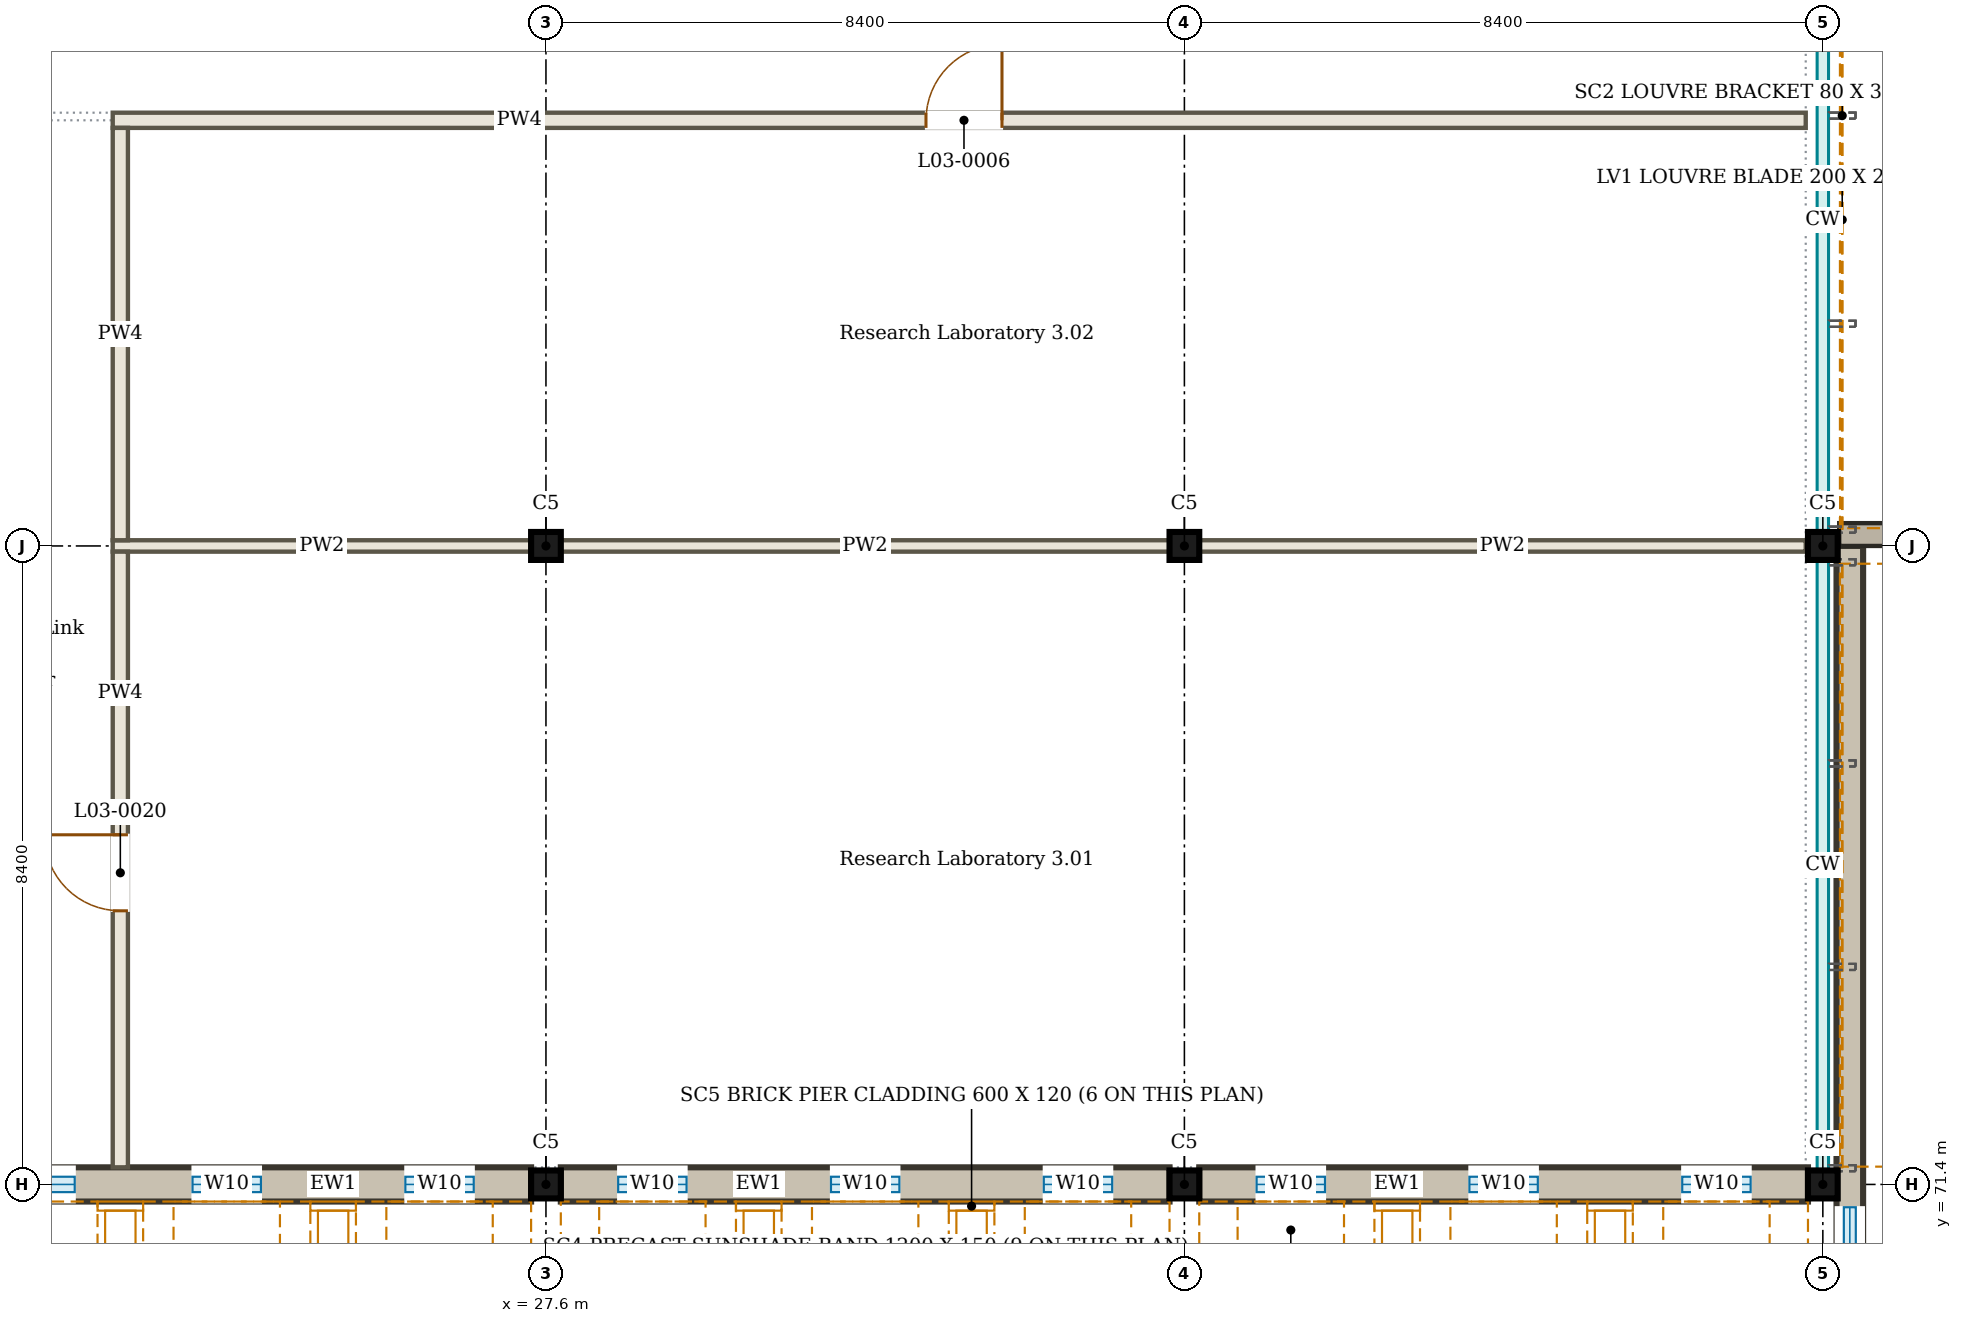
"""IFC4 building model, lengths in metres.
Left out: names, types, materials, properties, quantities, classifications, styles, units other than length and angle.
Written with IfcOpenShell. Run it as: python <this file> out.ifc"""

import sys

from ifc_helpers import new_model, si_unit, direction, frame, frame_2d, origin, origin_2d, place, context, subcontext, project, spatial, rectangle, i_section, extrude, element, fill, save


model = new_model("IFC4")
c1 = context("Model", 3, precision=1e-05, world=origin(), true_north=direction((0.0, 1.0)))
c2 = subcontext(c1, "Body", "Model", "MODEL_VIEW")
j1 = project(units=[si_unit("LENGTHUNIT", "METRE"), si_unit("PLANEANGLEUNIT", "RADIAN")], contexts=[c1])
p1 = place(None, origin())
s1 = spatial("IfcSite", under=j1, at=p1, CompositionType="ELEMENT")
p2 = place(p1, origin())
s2 = spatial("IfcBuilding", under=s1, at=p2, CompositionType="ELEMENT")
p3 = place(p2, frame((0.0, 0.0, 13.5)))
s3 = spatial("IfcBuildingStorey", under=s2, at=p3, CompositionType="ELEMENT", Elevation=13.5)
for number, where, z_axis, x_axis in (
    (1, (27.6, 71.4, 0.0), (0.0, 0.0, 1.0), (1.0, 0.0, 0.0)),
    (2, (36.0, 71.4, 0.0), (0.0, 0.0, 1.0), (1.0, 0.0, 0.0)),
    (3, (44.4, 71.4, 0.0), (0.0, 0.0, 1.0), (1.0, 0.0, 0.0)),
    (4, (27.6, 79.8, 0.0), (0.0, 0.0, 1.0), (1.0, 0.0, 0.0)),
    (5, (36.0, 79.8, 0.0), (0.0, 0.0, 1.0), (1.0, 0.0, 0.0)),
    (6, (44.4, 79.8, 0.0), (0.0, 0.0, 1.0), (1.0, 0.0, 0.0)),
):
    element("IfcColumn", number, at=place(p3, frame(where, z_axis=z_axis, x_axis=x_axis)), inside=s3, PredefinedType="COLUMN", context=c2, shape_type="SweptSolid", body=[
        extrude(i_section(OverallWidth=0.391, OverallDepth=0.368, WebThickness=0.015, FlangeThickness=0.024, FilletRadius=0.027, at=origin_2d()), origin(), (0.0, 0.0, 1.0), 4.5),
    ])
p4 = place(p3, frame((44.56, 71.584, 3.87), z_axis=(0.0, 0.0, 1.0), x_axis=(0.0, 1.0, 0.0)))
e7 = element("IfcWall", 7, at=p4, inside=s3, PredefinedType="SOLIDWALL", context=c2, shape_type="SweptSolid", body=[
    extrude(rectangle(XDim=8.032, YDim=0.13, at=frame_2d((4.016, 0.0))), origin(), (0.0, 0.0, 1.0), 0.63),
])
p5 = place(p3, frame((44.56, 79.984, 3.87), z_axis=(0.0, 0.0, 1.0), x_axis=(0.0, 1.0, 0.0)))
e8 = element("IfcWall", 8, at=p5, inside=s3, PredefinedType="SOLIDWALL", context=c2, shape_type="SweptSolid", body=[
    extrude(rectangle(XDim=8.216, YDim=0.13, at=frame_2d((4.108, 0.0))), origin(), (0.0, 0.0, 1.0), 0.63),
])
p6 = place(p3, frame((19.2, 71.4, 0.0), z_axis=(0.0, 0.0, 1.0), x_axis=(1.0, 0.0, 0.0)))
e9 = element("IfcWall", 9, at=p6, inside=s3, PredefinedType="SOLIDWALL", context=c2, shape_type="SweptSolid", body=[
    extrude(rectangle(XDim=8.205, YDim=0.45, at=frame_2d((4.102, 0.0))), origin(), (0.0, 0.0, 1.0), 3.85),
])
p7 = place(p6, frame((0.6, 0.0, 2.7)))
e10 = element("IfcOpeningElement", 10, at=p7, cuts=e9, PredefinedType="OPENING", context=c2, shape_type="SweptSolid", body=[
    extrude(rectangle(XDim=1.6, YDim=0.6, at=frame_2d((0.8, 0.3))), frame((0.0, 0.235, 0.0), z_axis=(0.0, -1.0, 0.0), x_axis=(1.0, 0.0, 0.0)), (0.0, 0.0, 1.0), 0.47),
])
p8 = place(p6, frame((3.75, 0.0, 1.0)))
e11 = element("IfcOpeningElement", 11, at=p8, cuts=e9, PredefinedType="OPENING", context=c2, shape_type="SweptSolid", body=[
    extrude(rectangle(XDim=0.9, YDim=1.2, at=frame_2d((0.45, 0.6))), frame((0.0, 0.235, 0.0), z_axis=(0.0, -1.0, 0.0), x_axis=(1.0, 0.0, 0.0)), (0.0, 0.0, 1.0), 0.47),
])
p9 = place(p6, frame((6.55, 0.0, 1.0)))
e12 = element("IfcOpeningElement", 12, at=p9, cuts=e9, PredefinedType="OPENING", context=c2, shape_type="SweptSolid", body=[
    extrude(rectangle(XDim=0.9, YDim=1.2, at=frame_2d((0.45, 0.6))), frame((0.0, 0.235, 0.0), z_axis=(0.0, -1.0, 0.0), x_axis=(1.0, 0.0, 0.0)), (0.0, 0.0, 1.0), 0.47),
])
p10 = place(p3, frame((19.2, 71.24, 3.87), z_axis=(0.0, 0.0, 1.0), x_axis=(1.0, 0.0, 0.0)))
e13 = element("IfcWall", 13, at=p10, inside=s3, PredefinedType="SOLIDWALL", context=c2, shape_type="SweptSolid", body=[
    extrude(rectangle(XDim=8.205, YDim=0.13, at=frame_2d((4.102, 0.0))), origin(), (0.0, 0.0, 1.0), 0.63),
])
p11 = place(p3, frame((27.795, 71.4, 0.0), z_axis=(0.0, 0.0, 1.0), x_axis=(1.0, 0.0, 0.0)))
e14 = element("IfcWall", 14, at=p11, inside=s3, PredefinedType="SOLIDWALL", context=c2, shape_type="SweptSolid", body=[
    extrude(rectangle(XDim=8.009, YDim=0.45, at=frame_2d((4.004, 0.0))), origin(), (0.0, 0.0, 1.0), 3.85),
])
p12 = place(p11, frame((0.754, 0.0, 1.0)))
e15 = element("IfcOpeningElement", 15, at=p12, cuts=e14, PredefinedType="OPENING", context=c2, shape_type="SweptSolid", body=[
    extrude(rectangle(XDim=0.9, YDim=1.2, at=frame_2d((0.45, 0.6))), frame((0.0, 0.235, 0.0), z_axis=(0.0, -1.0, 0.0), x_axis=(1.0, 0.0, 0.0)), (0.0, 0.0, 1.0), 0.47),
])
p13 = place(p11, frame((3.554, 0.0, 1.0)))
e16 = element("IfcOpeningElement", 16, at=p13, cuts=e14, PredefinedType="OPENING", context=c2, shape_type="SweptSolid", body=[
    extrude(rectangle(XDim=0.9, YDim=1.2, at=frame_2d((0.45, 0.6))), frame((0.0, 0.235, 0.0), z_axis=(0.0, -1.0, 0.0), x_axis=(1.0, 0.0, 0.0)), (0.0, 0.0, 1.0), 0.47),
])
p14 = place(p11, frame((6.354, 0.0, 1.0)))
e17 = element("IfcOpeningElement", 17, at=p14, cuts=e14, PredefinedType="OPENING", context=c2, shape_type="SweptSolid", body=[
    extrude(rectangle(XDim=0.9, YDim=1.2, at=frame_2d((0.45, 0.6))), frame((0.0, 0.235, 0.0), z_axis=(0.0, -1.0, 0.0), x_axis=(1.0, 0.0, 0.0)), (0.0, 0.0, 1.0), 0.47),
])
p15 = place(p3, frame((27.795, 71.24, 3.87), z_axis=(0.0, 0.0, 1.0), x_axis=(1.0, 0.0, 0.0)))
e18 = element("IfcWall", 18, at=p15, inside=s3, PredefinedType="SOLIDWALL", context=c2, shape_type="SweptSolid", body=[
    extrude(rectangle(XDim=8.009, YDim=0.13, at=frame_2d((4.004, 0.0))), origin(), (0.0, 0.0, 1.0), 0.63),
])
p16 = place(p3, frame((36.196, 71.4, 0.0), z_axis=(0.0, 0.0, 1.0), x_axis=(1.0, 0.0, 0.0)))
e19 = element("IfcWall", 19, at=p16, inside=s3, PredefinedType="SOLIDWALL", context=c2, shape_type="SweptSolid", body=[
    extrude(rectangle(XDim=8.009, YDim=0.45, at=frame_2d((4.004, 0.0))), origin(), (0.0, 0.0, 1.0), 3.85),
])
p17 = place(p16, frame((0.754, 0.0, 1.0)))
e20 = element("IfcOpeningElement", 20, at=p17, cuts=e19, PredefinedType="OPENING", context=c2, shape_type="SweptSolid", body=[
    extrude(rectangle(XDim=0.9, YDim=1.2, at=frame_2d((0.45, 0.6))), frame((0.0, 0.235, 0.0), z_axis=(0.0, -1.0, 0.0), x_axis=(1.0, 0.0, 0.0)), (0.0, 0.0, 1.0), 0.47),
])
p18 = place(p16, frame((3.554, 0.0, 1.0)))
e21 = element("IfcOpeningElement", 21, at=p18, cuts=e19, PredefinedType="OPENING", context=c2, shape_type="SweptSolid", body=[
    extrude(rectangle(XDim=0.9, YDim=1.2, at=frame_2d((0.45, 0.6))), frame((0.0, 0.235, 0.0), z_axis=(0.0, -1.0, 0.0), x_axis=(1.0, 0.0, 0.0)), (0.0, 0.0, 1.0), 0.47),
])
p19 = place(p16, frame((6.354, 0.0, 1.0)))
e22 = element("IfcOpeningElement", 22, at=p19, cuts=e19, PredefinedType="OPENING", context=c2, shape_type="SweptSolid", body=[
    extrude(rectangle(XDim=0.9, YDim=1.2, at=frame_2d((0.45, 0.6))), frame((0.0, 0.235, 0.0), z_axis=(0.0, -1.0, 0.0), x_axis=(1.0, 0.0, 0.0)), (0.0, 0.0, 1.0), 0.47),
])
p20 = place(p3, frame((36.196, 71.24, 3.87), z_axis=(0.0, 0.0, 1.0), x_axis=(1.0, 0.0, 0.0)))
e23 = element("IfcWall", 23, at=p20, inside=s3, PredefinedType="SOLIDWALL", context=c2, shape_type="SweptSolid", body=[
    extrude(rectangle(XDim=8.009, YDim=0.13, at=frame_2d((4.004, 0.0))), origin(), (0.0, 0.0, 1.0), 0.63),
])
p21 = place(p3, frame((44.615, 79.95, 0.0), z_axis=(0.0, 0.0, 1.0), x_axis=(1.0, 0.0, 0.0)))
e24 = element("IfcWall", 24, at=p21, inside=s3, PredefinedType="PARAPET", context=c2, shape_type="SweptSolid", body=[
    extrude(rectangle(XDim=8.185, YDim=0.3, at=frame_2d((4.092, 0.0))), origin(), (0.0, 0.0, 1.0), 1.0),
])
p22 = place(p3, frame((21.9, 79.8, 0.0), z_axis=(0.0, 0.0, 1.0), x_axis=(1.0, 0.0, 0.0)))
e25 = element("IfcWall", 25, at=p22, inside=s3, PredefinedType="PARTITIONING", context=c2, shape_type="SweptSolid", body=[
    extrude(rectangle(XDim=5.505, YDim=0.15, at=frame_2d((2.752, 0.0))), origin(), (0.0, 0.0, 1.0), 3.8),
])
p23 = place(p3, frame((27.795, 79.8, 0.0), z_axis=(0.0, 0.0, 1.0), x_axis=(1.0, 0.0, 0.0)))
e26 = element("IfcWall", 26, at=p23, inside=s3, PredefinedType="PARTITIONING", context=c2, shape_type="SweptSolid", body=[
    extrude(rectangle(XDim=8.009, YDim=0.15, at=frame_2d((4.004, 0.0))), origin(), (0.0, 0.0, 1.0), 3.8),
])
p24 = place(p3, frame((36.196, 79.8, 0.0), z_axis=(0.0, 0.0, 1.0), x_axis=(1.0, 0.0, 0.0)))
e27 = element("IfcWall", 27, at=p24, inside=s3, PredefinedType="PARTITIONING", context=c2, shape_type="SweptSolid", body=[
    extrude(rectangle(XDim=7.979, YDim=0.15, at=frame_2d((3.99, 0.0))), origin(), (0.0, 0.0, 1.0), 3.8),
])
p25 = place(p3, frame((21.9, 85.4, 0.0), z_axis=(0.0, 0.0, 1.0), x_axis=(1.0, 0.0, 0.0)))
e28 = element("IfcWall", 28, at=p25, inside=s3, PredefinedType="PARTITIONING", context=c2, shape_type="SweptSolid", body=[
    extrude(rectangle(XDim=22.275, YDim=0.2, at=frame_2d((11.138, 0.0))), origin(), (0.0, 0.0, 1.0), 3.8),
])
p26 = place(p25, frame((10.7, 0.0, 0.0)))
e29 = element("IfcOpeningElement", 29, at=p26, cuts=e28, PredefinedType="OPENING", context=c2, shape_type="SweptSolid", body=[
    extrude(rectangle(XDim=1.0, YDim=2.1, at=frame_2d((0.5, 1.05))), frame((0.0, 0.11, 0.0), z_axis=(0.0, -1.0, 0.0), x_axis=(1.0, 0.0, 0.0)), (0.0, 0.0, 1.0), 0.22),
])
p27 = place(p3, frame((22.0, 71.625, 0.0), z_axis=(0.0, 0.0, 1.0), x_axis=(0.0, 1.0, 0.0)))
e30 = element("IfcWall", 30, at=p27, inside=s3, PredefinedType="PARTITIONING", context=c2, shape_type="SweptSolid", body=[
    extrude(rectangle(XDim=8.1, YDim=0.2, at=frame_2d((4.05, 0.0))), origin(), (0.0, 0.0, 1.0), 3.8),
])
p28 = place(p27, frame((3.375, 0.0, 0.0)))
e31 = element("IfcOpeningElement", 31, at=p28, cuts=e30, PredefinedType="OPENING", context=c2, shape_type="SweptSolid", body=[
    extrude(rectangle(XDim=1.0, YDim=2.1, at=frame_2d((0.5, 1.05))), frame((0.0, 0.11, 0.0), z_axis=(0.0, -1.0, 0.0), x_axis=(1.0, 0.0, 0.0)), (0.0, 0.0, 1.0), 0.22),
])
p29 = place(p3, frame((22.0, 79.875, 0.0), z_axis=(0.0, 0.0, 1.0), x_axis=(0.0, 1.0, 0.0)))
e32 = element("IfcWall", 32, at=p29, inside=s3, PredefinedType="PARTITIONING", context=c2, shape_type="SweptSolid", body=[
    extrude(rectangle(XDim=5.425, YDim=0.2, at=frame_2d((2.712, 0.0))), origin(), (0.0, 0.0, 1.0), 3.8),
])
p30 = place(p7, origin())
e33 = element("IfcWindow", 33, at=p30, inside=s3, PartitioningType="SINGLE_PANEL", PredefinedType="WINDOW", context=c2, shape_type="SweptSolid", body=[
    extrude(rectangle(XDim=1.6, YDim=0.6, at=frame_2d((0.8, 0.3))), frame((0.0, 0.03, 0.0), z_axis=(0.0, -1.0, 0.0), x_axis=(1.0, 0.0, 0.0)), (0.0, 0.0, 1.0), 0.06),
])
fill(e10, e33)
p31 = place(p8, origin())
e34 = element("IfcWindow", 34, at=p31, inside=s3, PartitioningType="SINGLE_PANEL", PredefinedType="WINDOW", context=c2, shape_type="SweptSolid", body=[
    extrude(rectangle(XDim=0.9, YDim=1.2, at=frame_2d((0.45, 0.6))), frame((0.0, 0.135, 0.0), z_axis=(0.0, -1.0, 0.0), x_axis=(1.0, 0.0, 0.0)), (0.0, 0.0, 1.0), 0.06),
])
fill(e11, e34)
p32 = place(p9, origin())
e35 = element("IfcWindow", 35, at=p32, inside=s3, PartitioningType="SINGLE_PANEL", PredefinedType="WINDOW", context=c2, shape_type="SweptSolid", body=[
    extrude(rectangle(XDim=0.9, YDim=1.2, at=frame_2d((0.45, 0.6))), frame((0.0, 0.135, 0.0), z_axis=(0.0, -1.0, 0.0), x_axis=(1.0, 0.0, 0.0)), (0.0, 0.0, 1.0), 0.06),
])
fill(e12, e35)
p33 = place(p12, origin())
e36 = element("IfcWindow", 36, at=p33, inside=s3, PartitioningType="SINGLE_PANEL", PredefinedType="WINDOW", context=c2, shape_type="SweptSolid", body=[
    extrude(rectangle(XDim=0.9, YDim=1.2, at=frame_2d((0.45, 0.6))), frame((0.0, 0.135, 0.0), z_axis=(0.0, -1.0, 0.0), x_axis=(1.0, 0.0, 0.0)), (0.0, 0.0, 1.0), 0.06),
])
fill(e15, e36)
p34 = place(p13, origin())
e37 = element("IfcWindow", 37, at=p34, inside=s3, PartitioningType="SINGLE_PANEL", PredefinedType="WINDOW", context=c2, shape_type="SweptSolid", body=[
    extrude(rectangle(XDim=0.9, YDim=1.2, at=frame_2d((0.45, 0.6))), frame((0.0, 0.135, 0.0), z_axis=(0.0, -1.0, 0.0), x_axis=(1.0, 0.0, 0.0)), (0.0, 0.0, 1.0), 0.06),
])
fill(e16, e37)
p35 = place(p14, origin())
e38 = element("IfcWindow", 38, at=p35, inside=s3, PartitioningType="SINGLE_PANEL", PredefinedType="WINDOW", context=c2, shape_type="SweptSolid", body=[
    extrude(rectangle(XDim=0.9, YDim=1.2, at=frame_2d((0.45, 0.6))), frame((0.0, 0.135, 0.0), z_axis=(0.0, -1.0, 0.0), x_axis=(1.0, 0.0, 0.0)), (0.0, 0.0, 1.0), 0.06),
])
fill(e17, e38)
p36 = place(p17, origin())
e39 = element("IfcWindow", 39, at=p36, inside=s3, PartitioningType="SINGLE_PANEL", PredefinedType="WINDOW", context=c2, shape_type="SweptSolid", body=[
    extrude(rectangle(XDim=0.9, YDim=1.2, at=frame_2d((0.45, 0.6))), frame((0.0, 0.135, 0.0), z_axis=(0.0, -1.0, 0.0), x_axis=(1.0, 0.0, 0.0)), (0.0, 0.0, 1.0), 0.06),
])
fill(e20, e39)
p37 = place(p18, origin())
e40 = element("IfcWindow", 40, at=p37, inside=s3, PartitioningType="SINGLE_PANEL", PredefinedType="WINDOW", context=c2, shape_type="SweptSolid", body=[
    extrude(rectangle(XDim=0.9, YDim=1.2, at=frame_2d((0.45, 0.6))), frame((0.0, 0.135, 0.0), z_axis=(0.0, -1.0, 0.0), x_axis=(1.0, 0.0, 0.0)), (0.0, 0.0, 1.0), 0.06),
])
fill(e21, e40)
p38 = place(p19, origin())
e41 = element("IfcWindow", 41, at=p38, inside=s3, PartitioningType="SINGLE_PANEL", PredefinedType="WINDOW", context=c2, shape_type="SweptSolid", body=[
    extrude(rectangle(XDim=0.9, YDim=1.2, at=frame_2d((0.45, 0.6))), frame((0.0, 0.135, 0.0), z_axis=(0.0, -1.0, 0.0), x_axis=(1.0, 0.0, 0.0)), (0.0, 0.0, 1.0), 0.06),
])
fill(e22, e41)
p39 = place(p26, origin())
e42 = element("IfcDoor", 42, at=p39, inside=s3, OperationType="SINGLE_SWING_RIGHT", PredefinedType="DOOR", context=c2, shape_type="SweptSolid", body=[
    extrude(rectangle(XDim=1.0, YDim=2.1, at=frame_2d((0.5, 1.05))), frame((0.0, 0.025, 0.0), z_axis=(0.0, -1.0, 0.0), x_axis=(1.0, 0.0, 0.0)), (0.0, 0.0, 1.0), 0.05),
])
fill(e29, e42)
p40 = place(p28, origin())
e43 = element("IfcDoor", 43, at=p40, inside=s3, OperationType="SINGLE_SWING_RIGHT", PredefinedType="DOOR", context=c2, shape_type="SweptSolid", body=[
    extrude(rectangle(XDim=1.0, YDim=2.1, at=frame_2d((0.5, 1.05))), frame((0.0, 0.025, 0.0), z_axis=(0.0, -1.0, 0.0), x_axis=(1.0, 0.0, 0.0)), (0.0, 0.0, 1.0), 0.05),
])
fill(e31, e43)
save(model, sys.argv[1])
